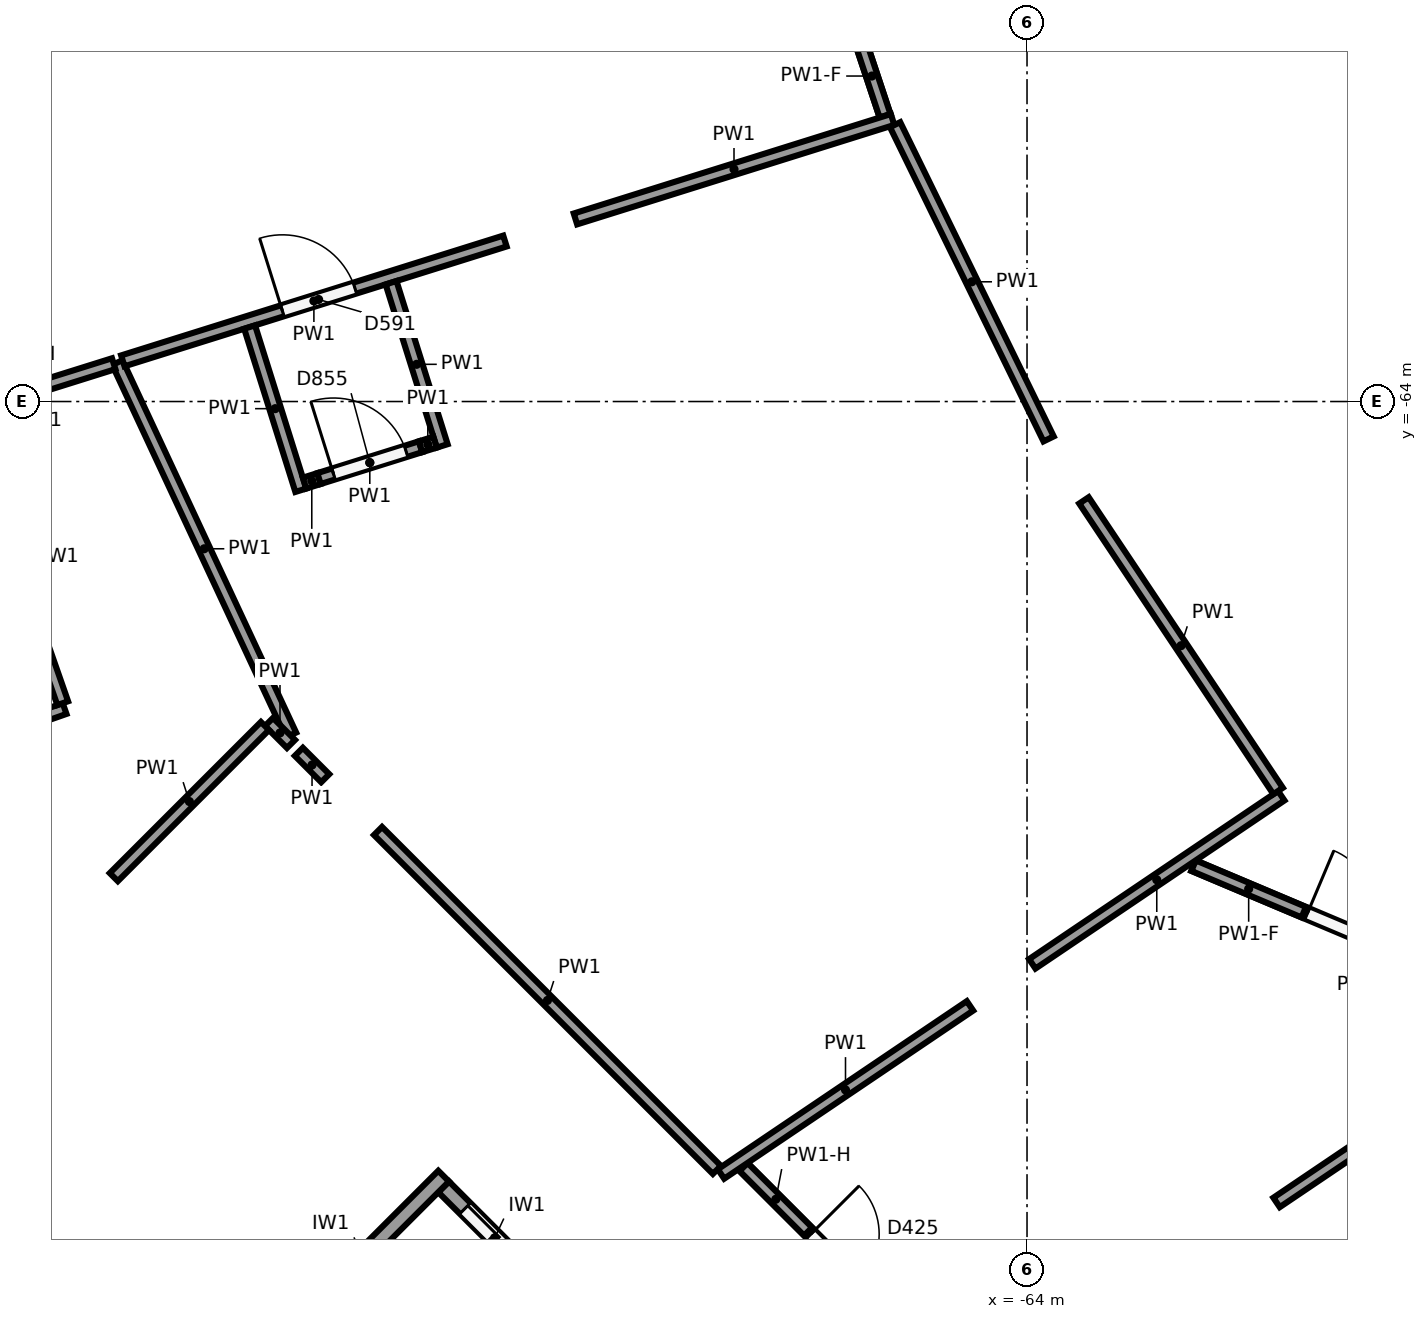
"""IFC4 building model, lengths in metres.
Left out: names, types, materials, properties, quantities, classifications, styles, units other than length and angle.
Written with IfcOpenShell. Run it as: python <this file> out.ifc"""

import sys

from ifc_helpers import new_model, si_unit, direction, frame, frame_2d, origin, origin_2d, place, context, subcontext, project, spatial, rectangle, circle, extrude, element, fill, save


model = new_model("IFC4")
c1 = context("Model", 3, precision=1e-05, world=origin(), true_north=direction((0.0, 1.0)))
c2 = subcontext(c1, "Body", "Model", "MODEL_VIEW")
j1 = project(units=[si_unit("LENGTHUNIT", "METRE"), si_unit("PLANEANGLEUNIT", "RADIAN")], contexts=[c1])
p1 = place(None, origin())
s1 = spatial("IfcSite", under=j1, at=p1, CompositionType="ELEMENT")
p2 = place(p1, origin())
s2 = spatial("IfcBuilding", under=s1, at=p2, CompositionType="ELEMENT")
p3 = place(p2, origin())
s3 = spatial("IfcBuildingStorey", under=s2, at=p3, CompositionType="ELEMENT", Elevation=0.0)
p4 = place(p3, frame((-71.17, -59.677, 0.0), z_axis=(0.0, 0.0, 1.0), x_axis=(1.0, 0.0, 0.0)))
e1 = element("IfcColumn", 1, at=p4, inside=s3, PredefinedType="COLUMN", context=c2, shape_type="SweptSolid", body=[
    extrude(circle(Radius=0.45, at=origin_2d()), origin(), (0.0, 0.0, 1.0), 6.5),
])
p5 = place(p3, frame((-60.222, -63.331, 0.0), z_axis=(0.0, 0.0, 1.0), x_axis=(1.0, 0.0, 0.0)))
e2 = element("IfcColumn", 2, at=p5, inside=s3, PredefinedType="COLUMN", context=c2, shape_type="SweptSolid", body=[
    extrude(circle(Radius=0.4, at=origin_2d()), origin(), (0.0, 0.0, 1.0), 6.5),
])
for number, where, z_axis, x_axis in (
    (3, (-67.972, -67.058, 0.0), (0.0, 0.0, 1.0), (1.0, 0.0, 0.0)),
    (4, (-63.068, -73.47, 0.0), (0.0, 0.0, 1.0), (1.0, 0.0, 0.0)),
):
    element("IfcColumn", number, at=place(p3, frame(where, z_axis=z_axis, x_axis=x_axis)), inside=s3, PredefinedType="COLUMN", context=c2, shape_type="SweptSolid", body=[
        extrude(circle(Radius=0.45, at=origin_2d()), origin(), (0.0, 0.0, 1.0), 6.5),
    ])
p6 = place(p3, frame((-73.797, -76.312, 0.0), z_axis=(0.0, 0.0, 1.0), x_axis=(0.707106781187, 0.707106781187, 0.0)))
e5 = element("IfcWall", 5, at=p6, inside=s3, PredefinedType="SHEAR", context=c2, shape_type="SweptSolid", body=[
    extrude(rectangle(XDim=3.0, YDim=0.2, at=frame_2d((1.5, 0.0))), origin(), (0.0, 0.0, 1.0), 6.15),
])
p7 = place(p3, frame((-71.676, -74.332, 0.0), z_axis=(0.0, 0.0, 1.0), x_axis=(0.707106781187, -0.707106781187, 0.0)))
e6 = element("IfcWall", 6, at=p7, inside=s3, PredefinedType="SHEAR", context=c2, shape_type="SweptSolid", body=[
    extrude(rectangle(XDim=1.9, YDim=0.2, at=frame_2d((0.95, 0.0))), origin(), (0.0, 0.0, 1.0), 6.15),
])
p8 = place(p7, frame((0.4, 0.0, 0.0)))
e7 = element("IfcOpeningElement", 7, at=p8, cuts=e6, PredefinedType="OPENING", context=c2, shape_type="SweptSolid", body=[
    extrude(rectangle(XDim=1.1, YDim=2.1, at=frame_2d((0.55, 1.05))), frame((0.0, 0.11, 0.0), z_axis=(0.0, -1.0, 0.0), x_axis=(1.0, 0.0, 0.0)), (0.0, 0.0, 1.0), 0.22),
])
p9 = place(p3, frame((-60.655, -69.186, 0.0), z_axis=(0.0, 0.0, 1.0), x_axis=(-0.828805713465, -0.559536495081, 0.0)))
e8 = element("IfcWall", 8, at=p9, inside=s3, PredefinedType="PARTITIONING", context=c2, shape_type="SweptSolid", body=[
    extrude(rectangle(XDim=3.953, YDim=0.15, at=frame_2d((1.977, 0.0))), origin(), (0.0, 0.0, 1.0), 6.15),
])
p10 = place(p3, frame((-64.75, -71.951, 0.0), z_axis=(0.0, 0.0, 1.0), x_axis=(-0.828815019126, -0.559522710952, 0.0)))
e9 = element("IfcWall", 9, at=p10, inside=s3, PredefinedType="PARTITIONING", context=c2, shape_type="SweptSolid", body=[
    extrude(rectangle(XDim=3.953, YDim=0.15, at=frame_2d((1.977, 0.0))), origin(), (0.0, 0.0, 1.0), 6.15),
])
p11 = place(p3, frame((-68.08, -74.109, 0.0), z_axis=(0.0, 0.0, 1.0), x_axis=(-0.70712613939, 0.707087422453, 0.0)))
e10 = element("IfcWall", 10, at=p11, inside=s3, PredefinedType="PARTITIONING", context=c2, shape_type="SweptSolid", body=[
    extrude(rectangle(XDim=6.306, YDim=0.15, at=frame_2d((3.153, 0.0))), origin(), (0.0, 0.0, 1.0), 6.15),
])
p12 = place(p3, frame((-73.233, -68.956, 0.0), z_axis=(0.0, 0.0, 1.0), x_axis=(-0.707355281174, 0.706858193837, 0.0)))
e11 = element("IfcWall", 11, at=p12, inside=s3, PredefinedType="PARTITIONING", context=c2, shape_type="SweptSolid", body=[
    extrude(rectangle(XDim=0.491, YDim=0.15, at=frame_2d((0.246, 0.0))), origin(), (0.0, 0.0, 1.0), 6.15),
])
p13 = place(p3, frame((-73.684, -68.387, 0.0), z_axis=(0.0, 0.0, 1.0), x_axis=(-0.42266047211, 0.906288102821, 0.0)))
e12 = element("IfcWall", 12, at=p13, inside=s3, PredefinedType="PARTITIONING", context=c2, shape_type="SweptSolid", body=[
    extrude(rectangle(XDim=5.406, YDim=0.15, at=frame_2d((2.703, 0.0))), origin(), (0.0, 0.0, 1.0), 6.15),
])
p14 = place(p3, frame((-75.896, -63.465, 0.0), z_axis=(0.0, 0.0, 1.0), x_axis=(0.954206671626, 0.29914817035, 0.0)))
e13 = element("IfcWall", 13, at=p14, inside=s3, PredefinedType="PARTITIONING", context=c2, shape_type="SweptSolid", body=[
    extrude(rectangle(XDim=5.269, YDim=0.15, at=frame_2d((2.634, 0.0))), origin(), (0.0, 0.0, 1.0), 6.15),
])
p15 = place(p14, frame((2.2, 0.0, 0.0)))
e14 = element("IfcOpeningElement", 14, at=p15, cuts=e13, PredefinedType="OPENING", context=c2, shape_type="SweptSolid", body=[
    extrude(rectangle(XDim=1.0, YDim=2.1, at=frame_2d((0.5, 1.05))), frame((0.0, 0.085, 0.0), z_axis=(0.0, -1.0, 0.0), x_axis=(1.0, 0.0, 0.0)), (0.0, 0.0, 1.0), 0.17),
])
p16 = place(p3, frame((-69.942, -61.598, 0.0), z_axis=(0.0, 0.0, 1.0), x_axis=(0.954192437986, 0.299193568262, 0.0)))
e15 = element("IfcWall", 15, at=p16, inside=s3, PredefinedType="PARTITIONING", context=c2, shape_type="SweptSolid", body=[
    extrude(rectangle(XDim=4.373, YDim=0.15, at=frame_2d((2.187, 0.0))), origin(), (0.0, 0.0, 1.0), 6.15),
])
p17 = place(p3, frame((-65.736, -60.358, 0.0), z_axis=(0.0, 0.0, 1.0), x_axis=(0.438916996059, -0.898527612581, 0.0)))
e16 = element("IfcWall", 16, at=p17, inside=s3, PredefinedType="PARTITIONING", context=c2, shape_type="SweptSolid", body=[
    extrude(rectangle(XDim=4.601, YDim=0.15, at=frame_2d((2.301, 0.0))), origin(), (0.0, 0.0, 1.0), 6.15),
])
p18 = place(p3, frame((-63.251, -65.301, 0.0), z_axis=(0.0, 0.0, 1.0), x_axis=(0.555582071925, -0.831461701677, 0.0)))
e17 = element("IfcWall", 17, at=p18, inside=s3, PredefinedType="PARTITIONING", context=c2, shape_type="SweptSolid", body=[
    extrude(rectangle(XDim=4.598, YDim=0.15, at=frame_2d((2.299, 0.0))), origin(), (0.0, 0.0, 1.0), 6.15),
])
p19 = place(p3, frame((-79.009, -68.861, 0.0), z_axis=(0.0, 0.0, 1.0), x_axis=(0.943873667714, 0.330306674768, 0.0)))
e18 = element("IfcWall", 18, at=p19, inside=s3, PredefinedType="PARTITIONING", context=c2, shape_type="SweptSolid", body=[
    extrude(rectangle(XDim=2.486, YDim=0.15, at=frame_2d((1.243, 0.0))), origin(), (0.0, 0.0, 1.0), 6.15),
])
p20 = place(p3, frame((-76.688, -67.969, 0.0), z_axis=(0.0, 0.0, 1.0), x_axis=(-0.330235334568, 0.943898630046, 0.0)))
e19 = element("IfcWall", 19, at=p20, inside=s3, PredefinedType="PARTITIONING", context=c2, shape_type="SweptSolid", body=[
    extrude(rectangle(XDim=4.063, YDim=0.15, at=frame_2d((2.032, 0.0))), origin(), (0.0, 0.0, 1.0), 6.15),
])
p21 = place(p3, frame((-77.958, -64.111, 0.0), z_axis=(0.0, 0.0, 1.0), x_axis=(0.954206277419, 0.299149427767, 0.0)))
e20 = element("IfcWall", 20, at=p21, inside=s3, PredefinedType="PARTITIONING", context=c2, shape_type="SweptSolid", body=[
    extrude(rectangle(XDim=2.035, YDim=0.15, at=frame_2d((1.017, 0.0))), origin(), (0.0, 0.0, 1.0), 6.15),
])
p22 = place(p3, frame((-73.684, -68.505, 0.0), z_axis=(0.0, 0.0, 1.0), x_axis=(-0.707106781187, 0.707106781187, 0.0)))
e21 = element("IfcWall", 21, at=p22, inside=s3, PredefinedType="PARTITIONING", context=c2, shape_type="SweptSolid", body=[
    extrude(rectangle(XDim=0.409, YDim=0.15, at=frame_2d((0.205, 0.0))), origin(), (0.0, 0.0, 1.0), 6.15),
])
p23 = place(p3, frame((-74.027, -68.269, 0.0), z_axis=(0.0, 0.0, 1.0), x_axis=(-0.707106781187, -0.707106781187, 0.0)))
e22 = element("IfcWall", 22, at=p23, inside=s3, PredefinedType="PARTITIONING", context=c2, shape_type="SweptSolid", body=[
    extrude(rectangle(XDim=2.812, YDim=0.15, at=frame_2d((1.406, 0.0))), origin(), (0.0, 0.0, 1.0), 6.15),
])
p24 = place(p3, frame((-60.717, -74.537, 0.0), z_axis=(0.0, 0.0, 1.0), x_axis=(0.828836712626, 0.559490575259, 0.0)))
e23 = element("IfcWall", 23, at=p24, inside=s3, PredefinedType="PARTITIONING", context=c2, shape_type="SweptSolid", body=[
    extrude(rectangle(XDim=4.496, YDim=0.15, at=frame_2d((2.248, 0.0))), origin(), (0.0, 0.0, 1.0), 6.15),
])
for number, where, z_axis, x_axis in (
    (24, (-74.228, -63.021, 0.0), (0.0, 0.0, 1.0), (0.299, -0.954, 0.0)),
    (25, (-72.367, -62.437, 0.0), (0.0, 0.0, 1.0), (0.299, -0.954, 0.0)),
):
    element("IfcWall", number, at=place(p3, frame(where, z_axis=z_axis, x_axis=x_axis)), inside=s3, PredefinedType="PARTITIONING", context=c2, shape_type="SweptSolid", body=[
        extrude(rectangle(XDim=2.25, YDim=0.15, at=frame_2d((1.125, 0.0))), origin(), (0.0, 0.0, 1.0), 6.15),
    ])
p25 = place(p3, frame((-73.506, -65.073, 0.0), z_axis=(0.0, 0.0, 1.0), x_axis=(0.953803895117, 0.300429908065, 0.0)))
e26 = element("IfcWall", 26, at=p25, inside=s3, PredefinedType="PARTITIONING", context=c2, shape_type="SweptSolid", body=[
    extrude(rectangle(XDim=0.2, YDim=0.15, at=frame_2d((0.1, 0.0))), origin(), (0.0, 0.0, 1.0), 6.15),
])
p26 = place(p3, frame((-73.315, -65.013, 0.0), z_axis=(0.0, 0.0, 1.0), x_axis=(0.954231413478, 0.299069238691, 0.0)))
e27 = element("IfcWall", 27, at=p26, inside=s3, PredefinedType="PARTITIONING", context=c2, shape_type="SweptSolid", body=[
    extrude(rectangle(XDim=1.4, YDim=0.15, at=frame_2d((0.7, 0.0))), origin(), (0.0, 0.0, 1.0), 6.15),
])
p27 = place(p26, frame((0.2, 0.0, 0.0)))
e28 = element("IfcOpeningElement", 28, at=p27, cuts=e27, PredefinedType="OPENING", context=c2, shape_type="SweptSolid", body=[
    extrude(rectangle(XDim=1.0, YDim=2.1, at=frame_2d((0.5, 1.05))), frame((0.0, 0.085, 0.0), z_axis=(0.0, -1.0, 0.0), x_axis=(1.0, 0.0, 0.0)), (0.0, 0.0, 1.0), 0.17),
])
p28 = place(p3, frame((-71.979, -64.595, 0.0), z_axis=(0.0, 0.0, 1.0), x_axis=(0.954262592634, 0.298969738101, 0.0)))
e29 = element("IfcWall", 29, at=p28, inside=s3, PredefinedType="PARTITIONING", context=c2, shape_type="SweptSolid", body=[
    extrude(rectangle(XDim=0.2, YDim=0.15, at=frame_2d((0.1, 0.0))), origin(), (0.0, 0.0, 1.0), 6.15),
])
p29 = place(p3, frame((-67.206, -56.209, 0.0), z_axis=(0.0, 0.0, 1.0), x_axis=(0.314951117126, -0.949107893667, 0.0)))
e30 = element("IfcWall", 30, at=p29, inside=s3, PredefinedType="PARTITIONING", context=c2, shape_type="SweptSolid", body=[
    extrude(rectangle(XDim=4.246, YDim=0.15, at=frame_2d((2.123, 0.0))), origin(), (0.0, 0.0, 1.0), 5.25),
])
p30 = place(p29, frame((1.296, 0.0, 0.0)))
e31 = element("IfcOpeningElement", 31, at=p30, cuts=e30, PredefinedType="OPENING", context=c2, shape_type="SweptSolid", body=[
    extrude(rectangle(XDim=1.8, YDim=2.1, at=frame_2d((0.9, 1.05))), frame((0.0, 0.085, 0.0), z_axis=(0.0, -1.0, 0.0), x_axis=(1.0, 0.0, 0.0)), (0.0, 0.0, 1.0), 0.17),
])
p31 = place(p3, frame((-66.215, -59.196, 5.25), z_axis=(0.0, 0.0, 1.0), x_axis=(0.314962308515, -0.949104179853, 0.0)))
e32 = element("IfcWall", 32, at=p31, inside=s3, PredefinedType="PARTITIONING", context=c2, shape_type="SweptSolid", body=[
    extrude(rectangle(XDim=1.1, YDim=0.15, at=frame_2d((0.55, 0.0))), origin(), (0.0, 0.0, 1.0), 0.9),
])
p32 = place(p3, frame((-67.729, -74.071, 0.0), z_axis=(0.0, 0.0, 1.0), x_axis=(0.707106781187, -0.707106781187, 0.0)))
e33 = element("IfcWall", 33, at=p32, inside=s3, PredefinedType="PARTITIONING", context=c2, shape_type="SweptSolid", body=[
    extrude(rectangle(XDim=4.298, YDim=0.15, at=frame_2d((2.149, 0.0))), origin(), (0.0, 0.0, 1.0), 5.05),
])
p33 = place(p32, frame((1.25, 0.0, 0.0)))
e34 = element("IfcOpeningElement", 34, at=p33, cuts=e33, PredefinedType="OPENING", context=c2, shape_type="SweptSolid", body=[
    extrude(rectangle(XDim=1.8, YDim=2.1, at=frame_2d((0.9, 1.05))), frame((0.0, 0.085, 0.0), z_axis=(0.0, -1.0, 0.0), x_axis=(1.0, 0.0, 0.0)), (0.0, 0.0, 1.0), 0.17),
])
p34 = place(p3, frame((-67.729, -74.071, 5.05), z_axis=(0.0, 0.0, 1.0), x_axis=(0.707106781187, -0.707106781187, 0.0)))
e35 = element("IfcWall", 35, at=p34, inside=s3, PredefinedType="PARTITIONING", context=c2, shape_type="SweptSolid", body=[
    extrude(rectangle(XDim=1.2, YDim=0.15, at=frame_2d((0.6, 0.0))), origin(), (0.0, 0.0, 1.0), 1.1),
])
p35 = place(p3, frame((-61.809, -70.106, 0.0), z_axis=(0.0, 0.0, 1.0), x_axis=(0.921339438191, -0.388759102316, 0.0)))
e36 = element("IfcWall", 36, at=p35, inside=s3, PredefinedType="PARTITIONING", context=c2, shape_type="SweptSolid", body=[
    extrude(rectangle(XDim=4.974, YDim=0.15, at=frame_2d((2.487, 0.0))), origin(), (0.0, 0.0, 1.0), 5.25),
])
p36 = place(p35, frame((1.624, 0.0, 0.0)))
e37 = element("IfcOpeningElement", 37, at=p36, cuts=e36, PredefinedType="OPENING", context=c2, shape_type="SweptSolid", body=[
    extrude(rectangle(XDim=1.8, YDim=2.1, at=frame_2d((0.9, 1.05))), frame((0.0, 0.085, 0.0), z_axis=(0.0, -1.0, 0.0), x_axis=(1.0, 0.0, 0.0)), (0.0, 0.0, 1.0), 0.17),
])
p37 = place(p3, frame((-61.809, -70.106, 5.25), z_axis=(0.0, 0.0, 1.0), x_axis=(0.921337247527, -0.38876429404, 0.0)))
e38 = element("IfcWall", 38, at=p37, inside=s3, PredefinedType="PARTITIONING", context=c2, shape_type="SweptSolid", body=[
    extrude(rectangle(XDim=1.574, YDim=0.15, at=frame_2d((0.787, 0.0))), origin(), (0.0, 0.0, 1.0), 0.9),
])
p38 = place(p8, origin())
e39 = element("IfcDoor", 39, at=p38, inside=s3, OperationType="SLIDING_TO_RIGHT", PredefinedType="DOOR", context=c2, shape_type="SweptSolid", body=[
    extrude(rectangle(XDim=1.1, YDim=2.1, at=frame_2d((0.55, 1.05))), frame((0.0, 0.025, 0.0), z_axis=(0.0, -1.0, 0.0), x_axis=(1.0, 0.0, 0.0)), (0.0, 0.0, 1.0), 0.05),
])
fill(e7, e39)
p39 = place(p15, origin())
e40 = element("IfcDoor", 40, at=p39, inside=s3, OperationType="SINGLE_SWING_LEFT", PredefinedType="DOOR", context=c2, shape_type="SweptSolid", body=[
    extrude(rectangle(XDim=1.0, YDim=2.1, at=frame_2d((0.5, 1.05))), frame((0.0, 0.025, 0.0), z_axis=(0.0, -1.0, 0.0), x_axis=(1.0, 0.0, 0.0)), (0.0, 0.0, 1.0), 0.05),
])
fill(e14, e40)
p40 = place(p27, origin())
e41 = element("IfcDoor", 41, at=p40, inside=s3, OperationType="SINGLE_SWING_LEFT", PredefinedType="DOOR", context=c2, shape_type="SweptSolid", body=[
    extrude(rectangle(XDim=1.0, YDim=2.1, at=frame_2d((0.5, 1.05))), frame((0.0, 0.025, 0.0), z_axis=(0.0, -1.0, 0.0), x_axis=(1.0, 0.0, 0.0)), (0.0, 0.0, 1.0), 0.05),
])
fill(e28, e41)
p41 = place(p33, origin())
e42 = element("IfcDoor", 42, at=p41, inside=s3, OperationType="DOUBLE_DOOR_SINGLE_SWING", PredefinedType="DOOR", context=c2, shape_type="SweptSolid", body=[
    extrude(rectangle(XDim=1.8, YDim=2.1, at=frame_2d((0.9, 1.05))), frame((0.0, 0.025, 0.0), z_axis=(0.0, -1.0, 0.0), x_axis=(1.0, 0.0, 0.0)), (0.0, 0.0, 1.0), 0.05),
])
fill(e34, e42)
p42 = place(p36, origin())
e43 = element("IfcDoor", 43, at=p42, inside=s3, OperationType="DOUBLE_DOOR_SINGLE_SWING", PredefinedType="DOOR", context=c2, shape_type="SweptSolid", body=[
    extrude(rectangle(XDim=1.8, YDim=2.1, at=frame_2d((0.9, 1.05))), frame((0.0, 0.025, 0.0), z_axis=(0.0, -1.0, 0.0), x_axis=(1.0, 0.0, 0.0)), (0.0, 0.0, 1.0), 0.05),
])
fill(e37, e43)
save(model, sys.argv[1])
